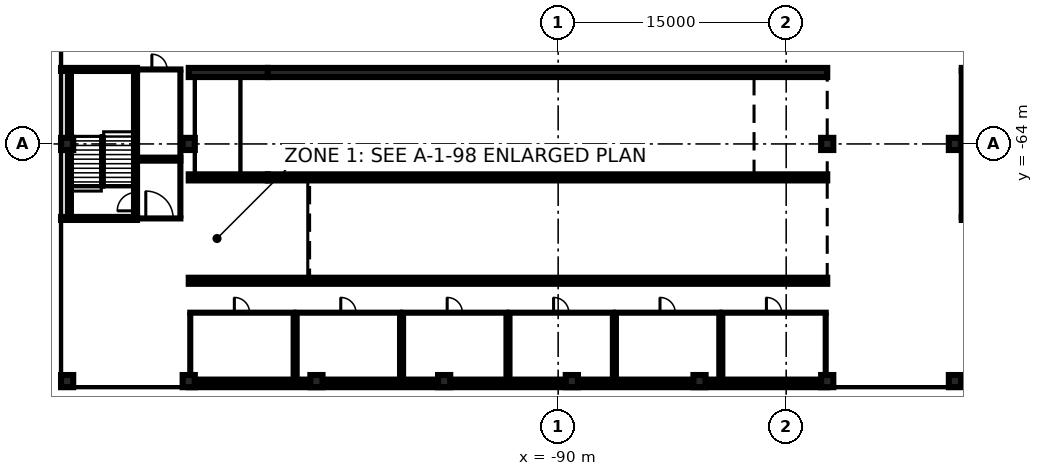
"""IFC4 building model, lengths in metres.
Left out: names, types, materials, properties, quantities, classifications, styles, units other than length and angle.
Written with IfcOpenShell. Run it as: python <this file> out.ifc"""

import sys

from ifc_helpers import new_model, si_unit, direction, frame, frame_2d, origin, origin_2d, place, context, subcontext, project, spatial, rectangle, extrude, element, fill, save


model = new_model("IFC4")
c1 = context("Model", 3, precision=1e-05, world=origin(), true_north=direction((0.0, 1.0)))
c2 = subcontext(c1, "Body", "Model", "MODEL_VIEW")
j1 = project(units=[si_unit("LENGTHUNIT", "METRE"), si_unit("PLANEANGLEUNIT", "RADIAN")], contexts=[c1])
p1 = place(None, origin())
s1 = spatial("IfcSite", under=j1, at=p1, CompositionType="ELEMENT")
p2 = place(p1, origin())
s2 = spatial("IfcBuilding", under=s1, at=p2, CompositionType="ELEMENT")
p3 = place(p2, frame((0.0, 0.0, -12.0)))
s3 = spatial("IfcBuildingStorey", under=s2, at=p3, CompositionType="ELEMENT", Elevation=-12.0)
p4 = place(p3, frame((-123.6, -80.45, 0.0), z_axis=(0.0, 0.0, 1.0), x_axis=(1.0, 0.0, 0.0)))
e1 = element("IfcWall", 1, at=p4, inside=s3, PredefinedType="USERDEFINED", context=c2, shape_type="SweptSolid", body=[
    extrude(rectangle(XDim=169.8, YDim=0.9, at=frame_2d((84.9, 0.0))), origin(), (0.0, 0.0, 1.0), 11.55),
])
p5 = place(p3, frame((-123.15, -80.0, 0.0), z_axis=(0.0, 0.0, 1.0), x_axis=(0.0, 1.0, 0.0)))
e2 = element("IfcWall", 2, at=p5, inside=s3, PredefinedType="USERDEFINED", context=c2, shape_type="SweptSolid", body=[
    extrude(rectangle(XDim=160.0, YDim=0.9, at=frame_2d((80.0, 0.0))), origin(), (0.0, 0.0, 1.0), 11.55),
])
p6 = place(p2, frame((0.0, 0.0, -3.6)))
s4 = spatial("IfcBuildingStorey", under=s2, at=p6, CompositionType="ELEMENT", Elevation=-3.6)
for number, where, z_axis, x_axis in (
    (3, (-122.3, -79.6, -0.4), (0.0, 0.0, 1.0), (1.0, 0.0, 0.0)),
    (4, (-122.3, -64.0, -0.4), (0.0, 0.0, 1.0), (1.0, 0.0, 0.0)),
    (5, (-114.3, -79.6, -0.4), (0.0, 0.0, 1.0), (1.0, 0.0, 0.0)),
    (6, (-114.3, -64.0, -0.4), (0.0, 0.0, 1.0), (1.0, 0.0, 0.0)),
    (7, (-105.9, -79.6, -0.4), (0.0, 0.0, 1.0), (1.0, 0.0, 0.0)),
    (8, (-97.5, -79.6, -0.4), (0.0, 0.0, 1.0), (1.0, 0.0, 0.0)),
    (9, (-89.1, -79.6, -0.4), (0.0, 0.0, 1.0), (1.0, 0.0, 0.0)),
    (10, (-80.7, -79.6, -0.4), (0.0, 0.0, 1.0), (1.0, 0.0, 0.0)),
    (11, (-72.3, -79.6, -0.4), (0.0, 0.0, 1.0), (1.0, 0.0, 0.0)),
    (12, (-72.3, -64.0, -0.4), (0.0, 0.0, 1.0), (1.0, 0.0, 0.0)),
    (13, (-63.9, -79.6, -0.4), (0.0, 0.0, 1.0), (1.0, 0.0, 0.0)),
    (14, (-63.9, -64.0, -0.4), (0.0, 0.0, 1.0), (1.0, 0.0, 0.0)),
):
    element("IfcColumn", number, at=place(p6, frame(where, z_axis=z_axis, x_axis=x_axis)), inside=s4, PredefinedType="COLUMN", context=c2, shape_type="SweptSolid", body=[
        extrude(rectangle(XDim=0.8, YDim=0.8, at=origin_2d()), origin(), (0.0, 0.0, 1.0), 3.55),
    ])
p7 = place(p6, frame((-114.3, -79.5, 0.0), z_axis=(0.0, 0.0, 1.0), x_axis=(1.0, 0.0, 0.0)))
e15 = element("IfcWall", 15, at=p7, inside=s4, PredefinedType="PARTITIONING", context=c2, shape_type="SweptSolid", body=[
    extrude(rectangle(XDim=7.0, YDim=0.2, at=frame_2d((3.5, 0.0))), origin(), (0.0, 0.0, 1.0), 3.15),
])
p8 = place(p6, frame((-114.3, -75.1, 0.0), z_axis=(0.0, 0.0, 1.0), x_axis=(1.0, 0.0, 0.0)))
e16 = element("IfcWall", 16, at=p8, inside=s4, PredefinedType="PARTITIONING", context=c2, shape_type="SweptSolid", body=[
    extrude(rectangle(XDim=7.0, YDim=0.2, at=frame_2d((3.5, 0.0))), origin(), (0.0, 0.0, 1.0), 3.15),
])
p9 = place(p8, frame((3.0, 0.0, 0.0)))
e17 = element("IfcOpeningElement", 17, at=p9, cuts=e16, PredefinedType="OPENING", context=c2, shape_type="SweptSolid", body=[
    extrude(rectangle(XDim=1.0, YDim=2.1, at=frame_2d((0.5, 1.05))), frame((0.0, 0.11, 0.0), z_axis=(0.0, -1.0, 0.0), x_axis=(1.0, 0.0, 0.0)), (0.0, 0.0, 1.0), 0.22),
])
p10 = place(p6, frame((-114.2, -79.2, 0.0), z_axis=(0.0, 0.0, 1.0), x_axis=(0.0, 1.0, 0.0)))
e18 = element("IfcWall", 18, at=p10, inside=s4, PredefinedType="PARTITIONING", context=c2, shape_type="SweptSolid", body=[
    extrude(rectangle(XDim=4.0, YDim=0.2, at=frame_2d((2.0, 0.0))), origin(), (0.0, 0.0, 1.0), 3.15),
])
p11 = place(p6, frame((-107.4, -79.4, 0.0), z_axis=(0.0, 0.0, 1.0), x_axis=(0.0, 1.0, 0.0)))
e19 = element("IfcWall", 19, at=p11, inside=s4, PredefinedType="PARTITIONING", context=c2, shape_type="SweptSolid", body=[
    extrude(rectangle(XDim=4.2, YDim=0.2, at=frame_2d((2.1, 0.0))), origin(), (0.0, 0.0, 1.0), 3.15),
])
p12 = place(p6, frame((-107.3, -79.5, 0.0), z_axis=(0.0, 0.0, 1.0), x_axis=(1.0, 0.0, 0.0)))
e20 = element("IfcWall", 20, at=p12, inside=s4, PredefinedType="PARTITIONING", context=c2, shape_type="SweptSolid", body=[
    extrude(rectangle(XDim=7.0, YDim=0.2, at=frame_2d((3.5, 0.0))), origin(), (0.0, 0.0, 1.0), 3.15),
])
p13 = place(p6, frame((-107.3, -75.1, 0.0), z_axis=(0.0, 0.0, 1.0), x_axis=(1.0, 0.0, 0.0)))
e21 = element("IfcWall", 21, at=p13, inside=s4, PredefinedType="PARTITIONING", context=c2, shape_type="SweptSolid", body=[
    extrude(rectangle(XDim=7.0, YDim=0.2, at=frame_2d((3.5, 0.0))), origin(), (0.0, 0.0, 1.0), 3.15),
])
p14 = place(p13, frame((3.0, 0.0, 0.0)))
e22 = element("IfcOpeningElement", 22, at=p14, cuts=e21, PredefinedType="OPENING", context=c2, shape_type="SweptSolid", body=[
    extrude(rectangle(XDim=1.0, YDim=2.1, at=frame_2d((0.5, 1.05))), frame((0.0, 0.11, 0.0), z_axis=(0.0, -1.0, 0.0), x_axis=(1.0, 0.0, 0.0)), (0.0, 0.0, 1.0), 0.22),
])
for number, where, z_axis, x_axis in (
    (23, (-107.2, -79.4, 0.0), (0.0, 0.0, 1.0), (0.0, 1.0, 0.0)),
    (24, (-100.4, -79.4, 0.0), (0.0, 0.0, 1.0), (0.0, 1.0, 0.0)),
):
    element("IfcWall", number, at=place(p6, frame(where, z_axis=z_axis, x_axis=x_axis)), inside=s4, PredefinedType="PARTITIONING", context=c2, shape_type="SweptSolid", body=[
        extrude(rectangle(XDim=4.2, YDim=0.2, at=frame_2d((2.1, 0.0))), origin(), (0.0, 0.0, 1.0), 3.15),
    ])
p15 = place(p6, frame((-100.3, -79.5, 0.0), z_axis=(0.0, 0.0, 1.0), x_axis=(1.0, 0.0, 0.0)))
e25 = element("IfcWall", 25, at=p15, inside=s4, PredefinedType="PARTITIONING", context=c2, shape_type="SweptSolid", body=[
    extrude(rectangle(XDim=7.0, YDim=0.2, at=frame_2d((3.5, 0.0))), origin(), (0.0, 0.0, 1.0), 3.15),
])
p16 = place(p6, frame((-100.3, -75.1, 0.0), z_axis=(0.0, 0.0, 1.0), x_axis=(1.0, 0.0, 0.0)))
e26 = element("IfcWall", 26, at=p16, inside=s4, PredefinedType="PARTITIONING", context=c2, shape_type="SweptSolid", body=[
    extrude(rectangle(XDim=7.0, YDim=0.2, at=frame_2d((3.5, 0.0))), origin(), (0.0, 0.0, 1.0), 3.15),
])
p17 = place(p16, frame((3.0, 0.0, 0.0)))
e27 = element("IfcOpeningElement", 27, at=p17, cuts=e26, PredefinedType="OPENING", context=c2, shape_type="SweptSolid", body=[
    extrude(rectangle(XDim=1.0, YDim=2.1, at=frame_2d((0.5, 1.05))), frame((0.0, 0.11, 0.0), z_axis=(0.0, -1.0, 0.0), x_axis=(1.0, 0.0, 0.0)), (0.0, 0.0, 1.0), 0.22),
])
for number, where, z_axis, x_axis in (
    (28, (-100.2, -79.4, 0.0), (0.0, 0.0, 1.0), (0.0, 1.0, 0.0)),
    (29, (-93.4, -79.4, 0.0), (0.0, 0.0, 1.0), (0.0, 1.0, 0.0)),
):
    element("IfcWall", number, at=place(p6, frame(where, z_axis=z_axis, x_axis=x_axis)), inside=s4, PredefinedType="PARTITIONING", context=c2, shape_type="SweptSolid", body=[
        extrude(rectangle(XDim=4.2, YDim=0.2, at=frame_2d((2.1, 0.0))), origin(), (0.0, 0.0, 1.0), 3.15),
    ])
p18 = place(p6, frame((-93.3, -79.5, 0.0), z_axis=(0.0, 0.0, 1.0), x_axis=(1.0, 0.0, 0.0)))
e30 = element("IfcWall", 30, at=p18, inside=s4, PredefinedType="PARTITIONING", context=c2, shape_type="SweptSolid", body=[
    extrude(rectangle(XDim=7.0, YDim=0.2, at=frame_2d((3.5, 0.0))), origin(), (0.0, 0.0, 1.0), 3.15),
])
p19 = place(p6, frame((-93.3, -75.1, 0.0), z_axis=(0.0, 0.0, 1.0), x_axis=(1.0, 0.0, 0.0)))
e31 = element("IfcWall", 31, at=p19, inside=s4, PredefinedType="PARTITIONING", context=c2, shape_type="SweptSolid", body=[
    extrude(rectangle(XDim=7.0, YDim=0.2, at=frame_2d((3.5, 0.0))), origin(), (0.0, 0.0, 1.0), 3.15),
])
p20 = place(p19, frame((3.0, 0.0, 0.0)))
e32 = element("IfcOpeningElement", 32, at=p20, cuts=e31, PredefinedType="OPENING", context=c2, shape_type="SweptSolid", body=[
    extrude(rectangle(XDim=1.0, YDim=2.1, at=frame_2d((0.5, 1.05))), frame((0.0, 0.11, 0.0), z_axis=(0.0, -1.0, 0.0), x_axis=(1.0, 0.0, 0.0)), (0.0, 0.0, 1.0), 0.22),
])
for number, where, z_axis, x_axis in (
    (33, (-93.2, -79.4, 0.0), (0.0, 0.0, 1.0), (0.0, 1.0, 0.0)),
    (34, (-86.4, -79.4, 0.0), (0.0, 0.0, 1.0), (0.0, 1.0, 0.0)),
):
    element("IfcWall", number, at=place(p6, frame(where, z_axis=z_axis, x_axis=x_axis)), inside=s4, PredefinedType="PARTITIONING", context=c2, shape_type="SweptSolid", body=[
        extrude(rectangle(XDim=4.2, YDim=0.2, at=frame_2d((2.1, 0.0))), origin(), (0.0, 0.0, 1.0), 3.15),
    ])
p21 = place(p6, frame((-86.3, -79.5, 0.0), z_axis=(0.0, 0.0, 1.0), x_axis=(1.0, 0.0, 0.0)))
e35 = element("IfcWall", 35, at=p21, inside=s4, PredefinedType="PARTITIONING", context=c2, shape_type="SweptSolid", body=[
    extrude(rectangle(XDim=7.0, YDim=0.2, at=frame_2d((3.5, 0.0))), origin(), (0.0, 0.0, 1.0), 3.15),
])
p22 = place(p6, frame((-86.3, -75.1, 0.0), z_axis=(0.0, 0.0, 1.0), x_axis=(1.0, 0.0, 0.0)))
e36 = element("IfcWall", 36, at=p22, inside=s4, PredefinedType="PARTITIONING", context=c2, shape_type="SweptSolid", body=[
    extrude(rectangle(XDim=7.0, YDim=0.2, at=frame_2d((3.5, 0.0))), origin(), (0.0, 0.0, 1.0), 3.15),
])
p23 = place(p22, frame((3.0, 0.0, 0.0)))
e37 = element("IfcOpeningElement", 37, at=p23, cuts=e36, PredefinedType="OPENING", context=c2, shape_type="SweptSolid", body=[
    extrude(rectangle(XDim=1.0, YDim=2.1, at=frame_2d((0.5, 1.05))), frame((0.0, 0.11, 0.0), z_axis=(0.0, -1.0, 0.0), x_axis=(1.0, 0.0, 0.0)), (0.0, 0.0, 1.0), 0.22),
])
for number, where, z_axis, x_axis in (
    (38, (-86.2, -79.4, 0.0), (0.0, 0.0, 1.0), (0.0, 1.0, 0.0)),
    (39, (-79.4, -79.4, 0.0), (0.0, 0.0, 1.0), (0.0, 1.0, 0.0)),
):
    element("IfcWall", number, at=place(p6, frame(where, z_axis=z_axis, x_axis=x_axis)), inside=s4, PredefinedType="PARTITIONING", context=c2, shape_type="SweptSolid", body=[
        extrude(rectangle(XDim=4.2, YDim=0.2, at=frame_2d((2.1, 0.0))), origin(), (0.0, 0.0, 1.0), 3.15),
    ])
p24 = place(p6, frame((-79.3, -79.5, 0.0), z_axis=(0.0, 0.0, 1.0), x_axis=(1.0, 0.0, 0.0)))
e40 = element("IfcWall", 40, at=p24, inside=s4, PredefinedType="PARTITIONING", context=c2, shape_type="SweptSolid", body=[
    extrude(rectangle(XDim=7.0, YDim=0.2, at=frame_2d((3.5, 0.0))), origin(), (0.0, 0.0, 1.0), 3.15),
])
p25 = place(p6, frame((-79.3, -75.1, 0.0), z_axis=(0.0, 0.0, 1.0), x_axis=(1.0, 0.0, 0.0)))
e41 = element("IfcWall", 41, at=p25, inside=s4, PredefinedType="PARTITIONING", context=c2, shape_type="SweptSolid", body=[
    extrude(rectangle(XDim=7.0, YDim=0.2, at=frame_2d((3.5, 0.0))), origin(), (0.0, 0.0, 1.0), 3.15),
])
p26 = place(p25, frame((3.0, 0.0, 0.0)))
e42 = element("IfcOpeningElement", 42, at=p26, cuts=e41, PredefinedType="OPENING", context=c2, shape_type="SweptSolid", body=[
    extrude(rectangle(XDim=1.0, YDim=2.1, at=frame_2d((0.5, 1.05))), frame((0.0, 0.11, 0.0), z_axis=(0.0, -1.0, 0.0), x_axis=(1.0, 0.0, 0.0)), (0.0, 0.0, 1.0), 0.22),
])
p27 = place(p6, frame((-79.2, -79.4, 0.0), z_axis=(0.0, 0.0, 1.0), x_axis=(0.0, 1.0, 0.0)))
e43 = element("IfcWall", 43, at=p27, inside=s4, PredefinedType="PARTITIONING", context=c2, shape_type="SweptSolid", body=[
    extrude(rectangle(XDim=4.2, YDim=0.2, at=frame_2d((2.1, 0.0))), origin(), (0.0, 0.0, 1.0), 3.15),
])
p28 = place(p6, frame((-72.4, -79.2, 0.0), z_axis=(0.0, 0.0, 1.0), x_axis=(0.0, 1.0, 0.0)))
e44 = element("IfcWall", 44, at=p28, inside=s4, PredefinedType="PARTITIONING", context=c2, shape_type="SweptSolid", body=[
    extrude(rectangle(XDim=4.0, YDim=0.2, at=frame_2d((2.0, 0.0))), origin(), (0.0, 0.0, 1.0), 3.15),
])
p29 = place(p6, frame((-117.7, -68.9, 0.0), z_axis=(0.0, 0.0, 1.0), x_axis=(1.0, 0.0, 0.0)))
e45 = element("IfcWall", 45, at=p29, inside=s4, PredefinedType="PARTITIONING", context=c2, shape_type="SweptSolid", body=[
    extrude(rectangle(XDim=2.95, YDim=0.2, at=frame_2d((1.475, 0.0))), origin(), (0.0, 0.0, 1.0), 3.15),
])
p30 = place(p29, frame((0.575, 0.0, 0.0)))
e46 = element("IfcOpeningElement", 46, at=p30, cuts=e45, PredefinedType="OPENING", context=c2, shape_type="SweptSolid", body=[
    extrude(rectangle(XDim=1.8, YDim=2.1, at=frame_2d((0.9, 1.05))), frame((0.0, 0.11, 0.0), z_axis=(0.0, -1.0, 0.0), x_axis=(1.0, 0.0, 0.0)), (0.0, 0.0, 1.0), 0.22),
])
p31 = place(p6, frame((-117.7, -65.1, 0.0), z_axis=(0.0, 0.0, 1.0), x_axis=(1.0, 0.0, 0.0)))
e47 = element("IfcWall", 47, at=p31, inside=s4, PredefinedType="PARTITIONING", context=c2, shape_type="SweptSolid", body=[
    extrude(rectangle(XDim=2.95, YDim=0.2, at=frame_2d((1.475, 0.0))), origin(), (0.0, 0.0, 1.0), 3.15),
])
p32 = place(p6, frame((-114.85, -68.8, 0.0), z_axis=(0.0, 0.0, 1.0), x_axis=(0.0, 1.0, 0.0)))
e48 = element("IfcWall", 48, at=p32, inside=s4, PredefinedType="PARTITIONING", context=c2, shape_type="SweptSolid", body=[
    extrude(rectangle(XDim=3.6, YDim=0.2, at=frame_2d((1.8, 0.0))), origin(), (0.0, 0.0, 1.0), 3.15),
])
p33 = place(p6, frame((-117.7, -64.9, 0.0), z_axis=(0.0, 0.0, 1.0), x_axis=(1.0, 0.0, 0.0)))
e49 = element("IfcWall", 49, at=p33, inside=s4, PredefinedType="PARTITIONING", context=c2, shape_type="SweptSolid", body=[
    extrude(rectangle(XDim=2.95, YDim=0.2, at=frame_2d((1.475, 0.0))), origin(), (0.0, 0.0, 1.0), 3.15),
])
p34 = place(p6, frame((-117.7, -59.1, 0.0), z_axis=(0.0, 0.0, 1.0), x_axis=(1.0, 0.0, 0.0)))
e50 = element("IfcWall", 50, at=p34, inside=s4, PredefinedType="PARTITIONING", context=c2, shape_type="SweptSolid", body=[
    extrude(rectangle(XDim=2.95, YDim=0.2, at=frame_2d((1.475, 0.0))), origin(), (0.0, 0.0, 1.0), 3.15),
])
p35 = place(p34, frame((0.975, 0.0, 0.0)))
e51 = element("IfcOpeningElement", 51, at=p35, cuts=e50, PredefinedType="OPENING", context=c2, shape_type="SweptSolid", body=[
    extrude(rectangle(XDim=1.0, YDim=2.1, at=frame_2d((0.5, 1.05))), frame((0.0, 0.11, 0.0), z_axis=(0.0, -1.0, 0.0), x_axis=(1.0, 0.0, 0.0)), (0.0, 0.0, 1.0), 0.22),
])
p36 = place(p6, frame((-114.85, -64.8, 0.0), z_axis=(0.0, 0.0, 1.0), x_axis=(0.0, 1.0, 0.0)))
e52 = element("IfcWall", 52, at=p36, inside=s4, PredefinedType="PARTITIONING", context=c2, shape_type="SweptSolid", body=[
    extrude(rectangle(XDim=5.6, YDim=0.2, at=frame_2d((2.8, 0.0))), origin(), (0.0, 0.0, 1.0), 3.15),
])
p37 = place(p6, frame((-63.35, -68.8, 0.0), z_axis=(0.0, 0.0, 1.0), x_axis=(0.0, 1.0, 0.0)))
e53 = element("IfcWall", 53, at=p37, inside=s4, PredefinedType="SOLIDWALL", context=c2, shape_type="SweptSolid", body=[
    extrude(rectangle(XDim=9.6, YDim=0.2, at=frame_2d((4.8, 0.0))), origin(), (0.0, 0.0, 1.0), 3.15),
])
for number, where, z_axis, x_axis in (
    (54, (-58.9, -68.9, 0.0), (0.0, 0.0, 1.0), (-1.0, 0.0, 0.0)),
    (55, (-63.45, -59.1, 0.0), (0.0, 0.0, 1.0), (1.0, 0.0, 0.0)),
):
    element("IfcWall", number, at=place(p6, frame(where, z_axis=z_axis, x_axis=x_axis)), inside=s4, PredefinedType="SOLIDWALL", context=c2, shape_type="SweptSolid", body=[
        extrude(rectangle(XDim=4.55, YDim=0.2, at=frame_2d((2.275, 0.0))), origin(), (0.0, 0.0, 1.0), 3.15),
    ])
p38 = place(p6, frame((-122.15, -68.8, 0.0), z_axis=(0.0, 0.0, 1.0), x_axis=(0.0, 1.0, 0.0)))
e56 = element("IfcWall", 56, at=p38, inside=s4, PredefinedType="SOLIDWALL", context=c2, shape_type="SweptSolid", body=[
    extrude(rectangle(XDim=9.6, YDim=0.2, at=frame_2d((4.8, 0.0))), origin(), (0.0, 0.0, 1.0), 3.15),
])
p39 = place(p6, frame((-117.8, -68.8, 0.0), z_axis=(0.0, 0.0, 1.0), x_axis=(0.0, 1.0, 0.0)))
e57 = element("IfcWall", 57, at=p39, inside=s4, PredefinedType="SOLIDWALL", context=c2, shape_type="SweptSolid", body=[
    extrude(rectangle(XDim=9.6, YDim=0.2, at=frame_2d((4.8, 0.0))), origin(), (0.0, 0.0, 1.0), 3.15),
])
p40 = place(p39, frame((0.4, 0.0, 0.0)))
e58 = element("IfcOpeningElement", 58, at=p40, cuts=e57, PredefinedType="OPENING", context=c2, shape_type="SweptSolid", body=[
    extrude(rectangle(XDim=1.2, YDim=2.1, at=frame_2d((0.6, 1.05))), frame((0.0, 0.11, 0.0), z_axis=(0.0, -1.0, 0.0), x_axis=(1.0, 0.0, 0.0)), (0.0, 0.0, 1.0), 0.22),
])
for number, where, z_axis, x_axis in (
    (59, (-117.7, -68.9, 0.0), (0.0, 0.0, 1.0), (-1.0, 0.0, 0.0)),
    (60, (-122.7, -59.1, 0.0), (0.0, 0.0, 1.0), (1.0, 0.0, 0.0)),
):
    element("IfcWall", number, at=place(p6, frame(where, z_axis=z_axis, x_axis=x_axis)), inside=s4, PredefinedType="SOLIDWALL", context=c2, shape_type="SweptSolid", body=[
        extrude(rectangle(XDim=5.0, YDim=0.2, at=frame_2d((2.5, 0.0))), origin(), (0.0, 0.0, 1.0), 3.15),
    ])
for number, where, z_axis, x_axis in (
    (61, (-114.3, -79.8, 0.0), (0.0, 0.0, 1.0), (1.0, 0.0, 0.0)),
    (62, (-114.3, -73.0, 0.0), (0.0, 0.0, 1.0), (1.0, 0.0, 0.0)),
):
    element("IfcWall", number, at=place(p6, frame(where, z_axis=z_axis, x_axis=x_axis)), inside=s4, PredefinedType="SOLIDWALL", context=c2, shape_type="SweptSolid", body=[
        extrude(rectangle(XDim=42.0, YDim=0.4, at=frame_2d((21.0, 0.0))), origin(), (0.0, 0.0, 1.0), 3.15),
    ])
p41 = place(p6, frame((-114.3, -66.2, 0.0), z_axis=(0.0, 0.0, 1.0), x_axis=(1.0, 0.0, 0.0)))
e63 = element("IfcWall", 63, at=p41, inside=s4, PredefinedType="SOLIDWALL", context=c2, shape_type="SweptSolid", body=[
    extrude(rectangle(XDim=5.2, YDim=0.4, at=frame_2d((2.6, 0.0))), origin(), (0.0, 0.0, 1.0), 3.15),
])
p42 = place(p6, frame((-109.1, -66.2, 0.0), z_axis=(0.0, 0.0, 1.0), x_axis=(1.0, 0.0, 0.0)))
e64 = element("IfcWall", 64, at=p42, inside=s4, PredefinedType="SOLIDWALL", context=c2, shape_type="SweptSolid", body=[
    extrude(rectangle(XDim=36.8, YDim=0.4, at=frame_2d((18.4, 0.0))), origin(), (0.0, 0.0, 1.0), 3.15),
])
p43 = place(p6, frame((-114.3, -59.3, 0.0), z_axis=(0.0, 0.0, 1.0), x_axis=(1.0, 0.0, 0.0)))
e65 = element("IfcWall", 65, at=p43, inside=s4, PredefinedType="SOLIDWALL", context=c2, shape_type="SweptSolid", body=[
    extrude(rectangle(XDim=5.2, YDim=0.6, at=frame_2d((2.6, 0.0))), origin(), (0.0, 0.0, 1.0), 3.15),
])
p44 = place(p6, frame((-109.1, -59.3, 0.0), z_axis=(0.0, 0.0, 1.0), x_axis=(1.0, 0.0, 0.0)))
e66 = element("IfcWall", 66, at=p44, inside=s4, PredefinedType="SOLIDWALL", context=c2, shape_type="SweptSolid", body=[
    extrude(rectangle(XDim=36.8, YDim=0.6, at=frame_2d((18.4, 0.0))), origin(), (0.0, 0.0, 1.0), 3.15),
])
p45 = place(p9, origin())
e67 = element("IfcDoor", 67, at=p45, inside=s4, OperationType="SINGLE_SWING_LEFT", PredefinedType="DOOR", context=c2, shape_type="SweptSolid", body=[
    extrude(rectangle(XDim=1.0, YDim=2.1, at=frame_2d((0.5, 1.05))), frame((0.0, 0.025, 0.0), z_axis=(0.0, -1.0, 0.0), x_axis=(1.0, 0.0, 0.0)), (0.0, 0.0, 1.0), 0.05),
])
fill(e17, e67)
p46 = place(p14, origin())
e68 = element("IfcDoor", 68, at=p46, inside=s4, OperationType="SINGLE_SWING_LEFT", PredefinedType="DOOR", context=c2, shape_type="SweptSolid", body=[
    extrude(rectangle(XDim=1.0, YDim=2.1, at=frame_2d((0.5, 1.05))), frame((0.0, 0.025, 0.0), z_axis=(0.0, -1.0, 0.0), x_axis=(1.0, 0.0, 0.0)), (0.0, 0.0, 1.0), 0.05),
])
fill(e22, e68)
p47 = place(p17, origin())
e69 = element("IfcDoor", 69, at=p47, inside=s4, OperationType="SINGLE_SWING_LEFT", PredefinedType="DOOR", context=c2, shape_type="SweptSolid", body=[
    extrude(rectangle(XDim=1.0, YDim=2.1, at=frame_2d((0.5, 1.05))), frame((0.0, 0.025, 0.0), z_axis=(0.0, -1.0, 0.0), x_axis=(1.0, 0.0, 0.0)), (0.0, 0.0, 1.0), 0.05),
])
fill(e27, e69)
p48 = place(p20, origin())
e70 = element("IfcDoor", 70, at=p48, inside=s4, OperationType="SINGLE_SWING_LEFT", PredefinedType="DOOR", context=c2, shape_type="SweptSolid", body=[
    extrude(rectangle(XDim=1.0, YDim=2.1, at=frame_2d((0.5, 1.05))), frame((0.0, 0.025, 0.0), z_axis=(0.0, -1.0, 0.0), x_axis=(1.0, 0.0, 0.0)), (0.0, 0.0, 1.0), 0.05),
])
fill(e32, e70)
p49 = place(p23, origin())
e71 = element("IfcDoor", 71, at=p49, inside=s4, OperationType="SINGLE_SWING_LEFT", PredefinedType="DOOR", context=c2, shape_type="SweptSolid", body=[
    extrude(rectangle(XDim=1.0, YDim=2.1, at=frame_2d((0.5, 1.05))), frame((0.0, 0.025, 0.0), z_axis=(0.0, -1.0, 0.0), x_axis=(1.0, 0.0, 0.0)), (0.0, 0.0, 1.0), 0.05),
])
fill(e37, e71)
p50 = place(p26, origin())
e72 = element("IfcDoor", 72, at=p50, inside=s4, OperationType="SINGLE_SWING_LEFT", PredefinedType="DOOR", context=c2, shape_type="SweptSolid", body=[
    extrude(rectangle(XDim=1.0, YDim=2.1, at=frame_2d((0.5, 1.05))), frame((0.0, 0.025, 0.0), z_axis=(0.0, -1.0, 0.0), x_axis=(1.0, 0.0, 0.0)), (0.0, 0.0, 1.0), 0.05),
])
fill(e42, e72)
p51 = place(p30, origin())
e73 = element("IfcDoor", 73, at=p51, inside=s4, OperationType="DOUBLE_DOOR_SINGLE_SWING", PredefinedType="DOOR", context=c2, shape_type="SweptSolid", body=[
    extrude(rectangle(XDim=1.8, YDim=2.1, at=frame_2d((0.9, 1.05))), frame((0.0, 0.025, 0.0), z_axis=(0.0, -1.0, 0.0), x_axis=(1.0, 0.0, 0.0)), (0.0, 0.0, 1.0), 0.05),
])
fill(e46, e73)
p52 = place(p35, origin())
e74 = element("IfcDoor", 74, at=p52, inside=s4, OperationType="SINGLE_SWING_LEFT", PredefinedType="DOOR", context=c2, shape_type="SweptSolid", body=[
    extrude(rectangle(XDim=1.0, YDim=2.1, at=frame_2d((0.5, 1.05))), frame((0.0, 0.025, 0.0), z_axis=(0.0, -1.0, 0.0), x_axis=(1.0, 0.0, 0.0)), (0.0, 0.0, 1.0), 0.05),
])
fill(e51, e74)
p53 = place(p40, origin())
e75 = element("IfcDoor", 75, at=p53, inside=s4, OperationType="SINGLE_SWING_LEFT", PredefinedType="DOOR", context=c2, shape_type="SweptSolid", body=[
    extrude(rectangle(XDim=1.2, YDim=2.1, at=frame_2d((0.6, 1.05))), frame((0.0, 0.025, 0.0), z_axis=(0.0, -1.0, 0.0), x_axis=(1.0, 0.0, 0.0)), (0.0, 0.0, 1.0), 0.05),
])
fill(e58, e75)
save(model, sys.argv[1])
